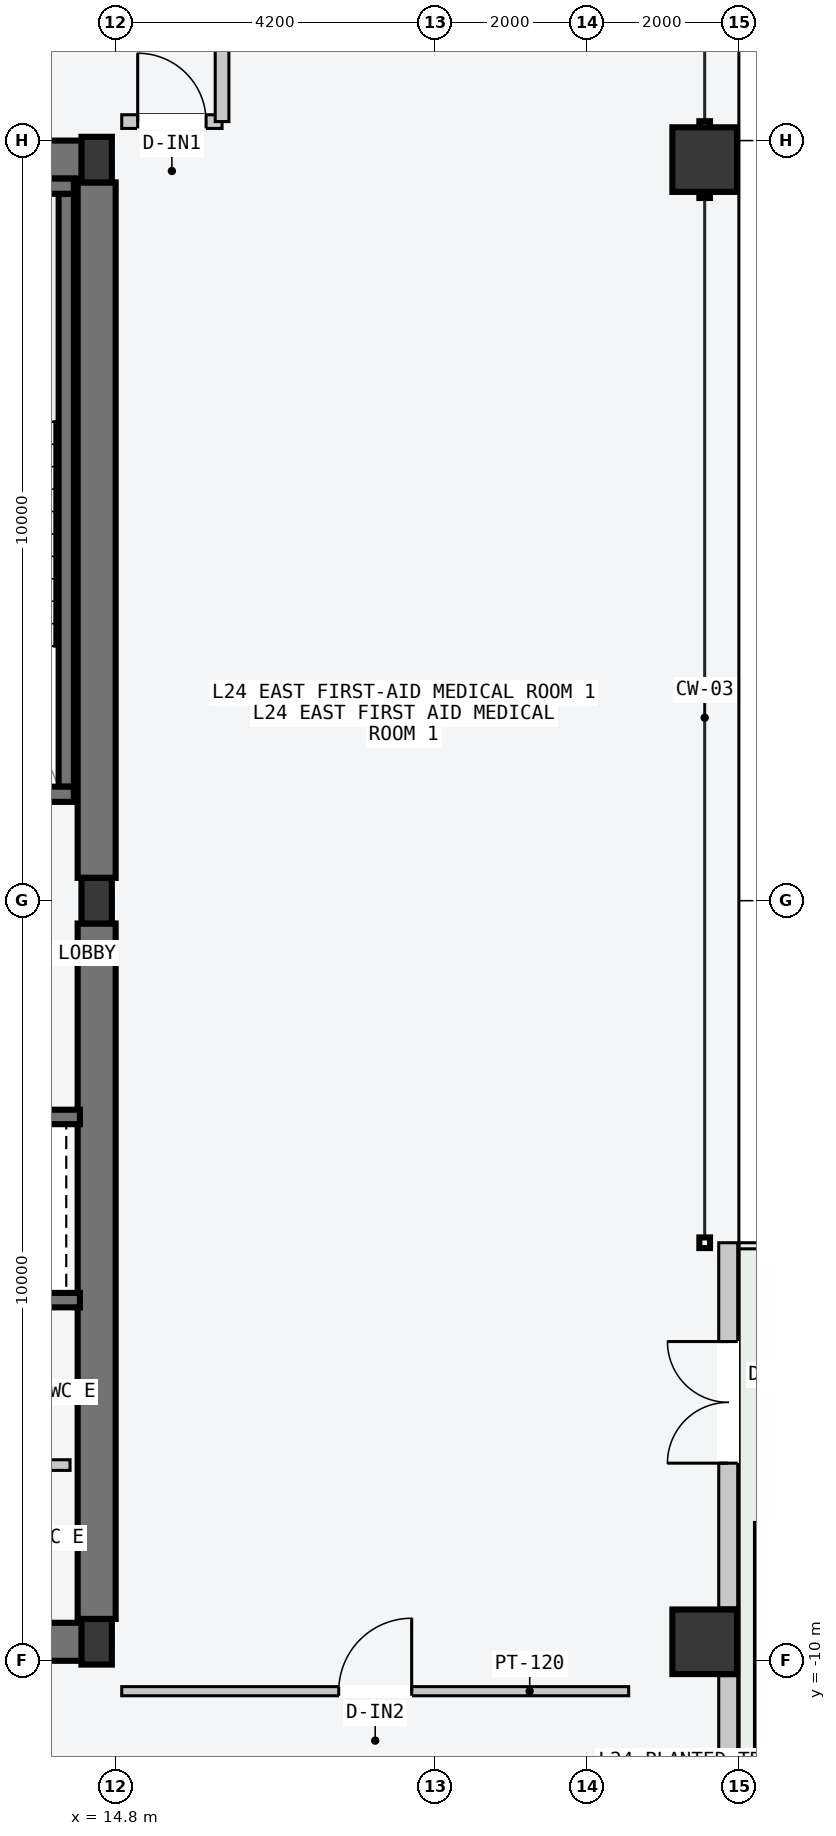
"""IFC4 building model, lengths in metres.
Left out: names, types, materials, properties, quantities, classifications, styles, units other than length and angle.
Written with IfcOpenShell. Run it as: python <this file> out.ifc"""

import sys

from ifc_helpers import new_model, si_unit, direction, frame, frame_2d, origin, origin_2d, place, context, subcontext, project, spatial, rectangle, hollow_rectangle, i_section, extrude, element, fill, save


model = new_model("IFC4")
c1 = context("Model", 3, precision=1e-05, world=origin(), true_north=direction((0.0, 1.0)))
c2 = subcontext(c1, "Body", "Model", "MODEL_VIEW")
j1 = project(units=[si_unit("LENGTHUNIT", "METRE"), si_unit("PLANEANGLEUNIT", "RADIAN")], contexts=[c1])
p1 = place(None, origin())
s1 = spatial("IfcSite", under=j1, at=p1, CompositionType="ELEMENT")
p2 = place(p1, origin())
s2 = spatial("IfcBuilding", under=s1, at=p2, CompositionType="ELEMENT")
p3 = place(p2, frame((0.0, 0.0, 95.4)))
s3 = spatial("IfcBuildingStorey", under=s2, at=p3, CompositionType="ELEMENT", Elevation=95.4)
for number, where, z_axis, x_axis in (
    (1, (8.07, -9.75, -0.2), (0.0, 0.0, 1.0), (1.0, 0.0, 0.0)),
    (2, (8.07, 9.75, -0.2), (0.0, 0.0, 1.0), (1.0, 0.0, 0.0)),
):
    element("IfcWall", number, at=place(p3, frame(where, z_axis=z_axis, x_axis=x_axis)), inside=s3, PredefinedType="SHEAR", context=c2, shape_type="SweptSolid", body=[
        extrude(rectangle(XDim=6.46, YDim=0.5, at=frame_2d((3.23, 0.0))), origin(), (0.0, 0.0, 1.0), 3.6),
    ])
for number, where, z_axis, x_axis in (
    (3, (14.55, -9.45, -0.2), (0.0, 0.0, 1.0), (0.0, 1.0, 0.0)),
    (4, (14.55, 0.3, -0.2), (0.0, 0.0, 1.0), (0.0, 1.0, 0.0)),
):
    element("IfcWall", number, at=place(p3, frame(where, z_axis=z_axis, x_axis=x_axis)), inside=s3, PredefinedType="SHEAR", context=c2, shape_type="SweptSolid", body=[
        extrude(rectangle(XDim=9.15, YDim=0.5, at=frame_2d((4.575, 0.0))), origin(), (0.0, 0.0, 1.0), 3.6),
    ])
p4 = place(p3, frame((14.15, 1.5, -0.2), z_axis=(0.0, 0.0, 1.0), x_axis=(0.0, 1.0, 0.0)))
e5 = element("IfcWall", 5, at=p4, inside=s3, PredefinedType="SOLIDWALL", context=c2, shape_type="SweptSolid", body=[
    extrude(rectangle(XDim=7.8, YDim=0.2, at=frame_2d((3.9, 0.0))), origin(), (0.0, 0.0, 1.0), 3.6),
])
p5 = place(p3, frame((10.15, 1.4, -0.2), z_axis=(0.0, 0.0, 1.0), x_axis=(1.0, 0.0, 0.0)))
e6 = element("IfcWall", 6, at=p5, inside=s3, PredefinedType="SOLIDWALL", context=c2, shape_type="SweptSolid", body=[
    extrude(rectangle(XDim=4.1, YDim=0.2, at=frame_2d((2.05, 0.0))), origin(), (0.0, 0.0, 1.0), 3.6),
])
p6 = place(p5, frame((1.5, 0.0, 0.2)))
e7 = element("IfcOpeningElement", 7, at=p6, cuts=e6, PredefinedType="OPENING", context=c2, shape_type="SweptSolid", body=[
    extrude(rectangle(XDim=1.12, YDim=2.18, at=frame_2d((0.56, 1.09))), frame((0.0, 0.11, 0.0), z_axis=(0.0, -1.0, 0.0), x_axis=(1.0, 0.0, 0.0)), (0.0, 0.0, 1.0), 0.22),
])
p7 = place(p3, frame((10.15, 9.4, -0.2), z_axis=(0.0, 0.0, 1.0), x_axis=(1.0, 0.0, 0.0)))
e8 = element("IfcWall", 8, at=p7, inside=s3, PredefinedType="SOLIDWALL", context=c2, shape_type="SweptSolid", body=[
    extrude(rectangle(XDim=4.1, YDim=0.2, at=frame_2d((2.05, 0.0))), origin(), (0.0, 0.0, 1.0), 3.6),
])
for number, where, z_axis, x_axis in (
    (9, (14.55, -9.75, 0.0), (0.0, 0.0, 1.0), (1.0, 0.0, 0.0)),
    (10, (14.55, 0.0, 0.0), (0.0, 0.0, 1.0), (1.0, 0.0, 0.0)),
    (11, (14.55, 9.75, 0.0), (0.0, 0.0, 1.0), (1.0, 0.0, 0.0)),
):
    element("IfcColumn", number, at=place(p3, frame(where, z_axis=z_axis, x_axis=x_axis)), inside=s3, PredefinedType="COLUMN", context=c2, shape_type="SweptSolid", body=[
        extrude(i_section(OverallWidth=0.4, OverallDepth=0.6, WebThickness=0.022, FlangeThickness=0.036, at=origin_2d()), origin(), (0.0, 0.0, 1.0), 3.6),
    ])
for number, where, z_axis, x_axis in (
    (12, (22.55, -9.75, 0.0), (0.0, 0.0, 1.0), (0.0, 1.0, 0.0)),
    (13, (22.55, 9.75, 0.0), (0.0, 0.0, 1.0), (0.0, 1.0, 0.0)),
):
    element("IfcColumn", number, at=place(p3, frame(where, z_axis=z_axis, x_axis=x_axis)), inside=s3, PredefinedType="COLUMN", context=c2, shape_type="SweptSolid", body=[
        extrude(hollow_rectangle(XDim=0.85, YDim=0.85, WallThickness=0.04, at=origin_2d()), origin(), (0.0, 0.0, 1.0), 3.6),
    ])
p8 = place(p3, frame((22.86, -14.605, 0.0), z_axis=(0.0, 0.0, 1.0), x_axis=(0.0, 1.0, 0.0)))
e14 = element("IfcWall", 14, at=p8, inside=s3, PredefinedType="STANDARD", context=c2, shape_type="SweptSolid", body=[
    extrude(rectangle(XDim=4.41, YDim=0.25, at=frame_2d((2.205, 0.0))), origin(), (0.0, 0.0, 1.0), 3.4),
])
p9 = place(p8, frame((1.405, 0.0, 0.85)))
e15 = element("IfcOpeningElement", 15, at=p9, cuts=e14, PredefinedType="OPENING", context=c2, shape_type="SweptSolid", body=[
    extrude(rectangle(XDim=2.0, YDim=2.1, at=frame_2d((1.0, 1.05))), frame((0.0, 0.135, 0.0), z_axis=(0.0, -1.0, 0.0), x_axis=(1.0, 0.0, 0.0)), (0.0, 0.0, 1.0), 0.27),
])
p10 = place(p3, frame((22.86, -9.305, 0.0), z_axis=(0.0, 0.0, 1.0), x_axis=(0.0, 1.0, 0.0)))
e16 = element("IfcWall", 16, at=p10, inside=s3, PredefinedType="STANDARD", context=c2, shape_type="SweptSolid", body=[
    extrude(rectangle(XDim=4.805, YDim=0.25, at=frame_2d((2.402, 0.0))), origin(), (0.0, 0.0, 1.0), 3.4),
])
p11 = place(p10, frame((1.905, 0.0, 0.0)))
e17 = element("IfcOpeningElement", 17, at=p11, cuts=e16, PredefinedType="OPENING", context=c2, shape_type="SweptSolid", body=[
    extrude(rectangle(XDim=1.6, YDim=2.2, at=frame_2d((0.8, 1.1))), frame((0.0, 0.135, 0.0), z_axis=(0.0, -1.0, 0.0), x_axis=(1.0, 0.0, 0.0)), (0.0, 0.0, 1.0), 0.27),
])
p12 = place(p3, frame((11.65, -2.845, -0.2), z_axis=(0.0, 0.0, 1.0), x_axis=(1.0, 0.0, 0.0)))
e18 = element("IfcWall", 18, at=p12, inside=s3, PredefinedType="SOLIDWALL", context=c2, shape_type="SweptSolid", body=[
    extrude(rectangle(XDim=2.68, YDim=0.19, at=frame_2d((1.34, 0.0))), origin(), (0.0, 0.0, 1.0), 3.6),
])
p13 = place(p12, frame((0.65, 0.0, 0.2)))
e19 = element("IfcOpeningElement", 19, at=p13, cuts=e18, PredefinedType="OPENING", context=c2, shape_type="SweptSolid", body=[
    extrude(rectangle(XDim=1.2, YDim=2.2, at=frame_2d((0.6, 1.1))), frame((0.0, 0.105, 0.0), z_axis=(0.0, -1.0, 0.0), x_axis=(1.0, 0.0, 0.0)), (0.0, 0.0, 1.0), 0.21),
])
p14 = place(p3, frame((11.65, -5.255, -0.2), z_axis=(0.0, 0.0, 1.0), x_axis=(1.0, 0.0, 0.0)))
e20 = element("IfcWall", 20, at=p14, inside=s3, PredefinedType="SOLIDWALL", context=c2, shape_type="SweptSolid", body=[
    extrude(rectangle(XDim=2.68, YDim=0.19, at=frame_2d((1.34, 0.0))), origin(), (0.0, 0.0, 1.0), 3.6),
])
p15 = place(p3, frame((11.7, -7.425, 0.0), z_axis=(0.0, 0.0, 1.0), x_axis=(1.0, 0.0, 0.0)))
e21 = element("IfcWall", 21, at=p15, inside=s3, PredefinedType="PARTITIONING", context=c2, shape_type="SweptSolid", body=[
    extrude(rectangle(XDim=2.5, YDim=0.14, at=frame_2d((1.25, 0.0))), origin(), (0.0, 0.0, 1.0), 3.4),
])
p16 = place(p3, frame((14.88, -10.4, 0.0), z_axis=(0.0, 0.0, 1.0), x_axis=(1.0, 0.0, 0.0)))
e22 = element("IfcWall", 22, at=p16, inside=s3, PredefinedType="PARTITIONING", context=c2, shape_type="SweptSolid", body=[
    extrude(rectangle(XDim=6.67, YDim=0.12, at=frame_2d((3.335, 0.0))), origin(), (0.0, 0.0, 1.0), 3.4),
])
p17 = place(p16, frame((2.855, 0.0, 0.0)))
e23 = element("IfcOpeningElement", 23, at=p17, cuts=e22, PredefinedType="OPENING", context=c2, shape_type="SweptSolid", body=[
    extrude(rectangle(XDim=0.96, YDim=2.18, at=frame_2d((0.48, 1.09))), frame((0.0, 0.07, 0.0), z_axis=(0.0, -1.0, 0.0), x_axis=(1.0, 0.0, 0.0)), (0.0, 0.0, 1.0), 0.14),
])
p18 = place(p3, frame((14.88, 10.25, 0.0), z_axis=(0.0, 0.0, 1.0), x_axis=(1.0, 0.0, 0.0)))
e24 = element("IfcWall", 24, at=p18, inside=s3, PredefinedType="PARTITIONING", context=c2, shape_type="SweptSolid", body=[
    extrude(rectangle(XDim=1.32, YDim=0.18, at=frame_2d((0.66, 0.0))), origin(), (0.0, 0.0, 1.0), 3.4),
])
p19 = place(p18, frame((0.21, 0.0, 0.0)))
e25 = element("IfcOpeningElement", 25, at=p19, cuts=e24, PredefinedType="OPENING", context=c2, shape_type="SweptSolid", body=[
    extrude(rectangle(XDim=0.9, YDim=2.15, at=frame_2d((0.45, 1.075))), frame((0.0, 0.1, 0.0), z_axis=(0.0, -1.0, 0.0), x_axis=(1.0, 0.0, 0.0)), (0.0, 0.0, 1.0), 0.2),
])
p20 = place(p3, frame((16.2, 10.25, 0.0), z_axis=(0.0, 0.0, 1.0), x_axis=(0.0, 1.0, 0.0)))
e26 = element("IfcWall", 26, at=p20, inside=s3, PredefinedType="PARTITIONING", context=c2, shape_type="SweptSolid", body=[
    extrude(rectangle(XDim=1.95, YDim=0.18, at=frame_2d((0.975, 0.0))), origin(), (0.0, 0.0, 1.0), 3.4),
])
p21 = place(p9, origin())
e27 = element("IfcWindow", 27, at=p21, inside=s3, PartitioningType="SINGLE_PANEL", PredefinedType="WINDOW", context=c2, shape_type="SweptSolid", body=[
    extrude(rectangle(XDim=2.0, YDim=2.1, at=frame_2d((1.0, 1.05))), frame((0.0, 0.03, 0.0), z_axis=(0.0, -1.0, 0.0), x_axis=(1.0, 0.0, 0.0)), (0.0, 0.0, 1.0), 0.06),
])
fill(e15, e27)
p22 = place(p11, origin())
e28 = element("IfcDoor", 28, at=p22, inside=s3, OperationType="DOUBLE_DOOR_SINGLE_SWING", PredefinedType="DOOR", context=c2, shape_type="SweptSolid", body=[
    extrude(rectangle(XDim=1.6, YDim=2.2, at=frame_2d((0.8, 1.1))), frame((0.0, 0.025, 0.0), z_axis=(0.0, -1.0, 0.0), x_axis=(1.0, 0.0, 0.0)), (0.0, 0.0, 1.0), 0.05),
])
fill(e17, e28)
p23 = place(p17, origin())
e29 = element("IfcDoor", 29, at=p23, inside=s3, OperationType="SINGLE_SWING_RIGHT", PredefinedType="DOOR", context=c2, shape_type="SweptSolid", body=[
    extrude(rectangle(XDim=0.96, YDim=2.18, at=frame_2d((0.48, 1.09))), frame((0.0, 0.025, 0.0), z_axis=(0.0, -1.0, 0.0), x_axis=(1.0, 0.0, 0.0)), (0.0, 0.0, 1.0), 0.05),
])
fill(e23, e29)
p24 = place(p19, origin())
e30 = element("IfcDoor", 30, at=p24, inside=s3, OperationType="SINGLE_SWING_LEFT", PredefinedType="DOOR", context=c2, shape_type="SweptSolid", body=[
    extrude(rectangle(XDim=0.9, YDim=2.15, at=frame_2d((0.45, 1.075))), frame((0.0, 0.025, 0.0), z_axis=(0.0, -1.0, 0.0), x_axis=(1.0, 0.0, 0.0)), (0.0, 0.0, 1.0), 0.05),
])
fill(e25, e30)
save(model, sys.argv[1])
